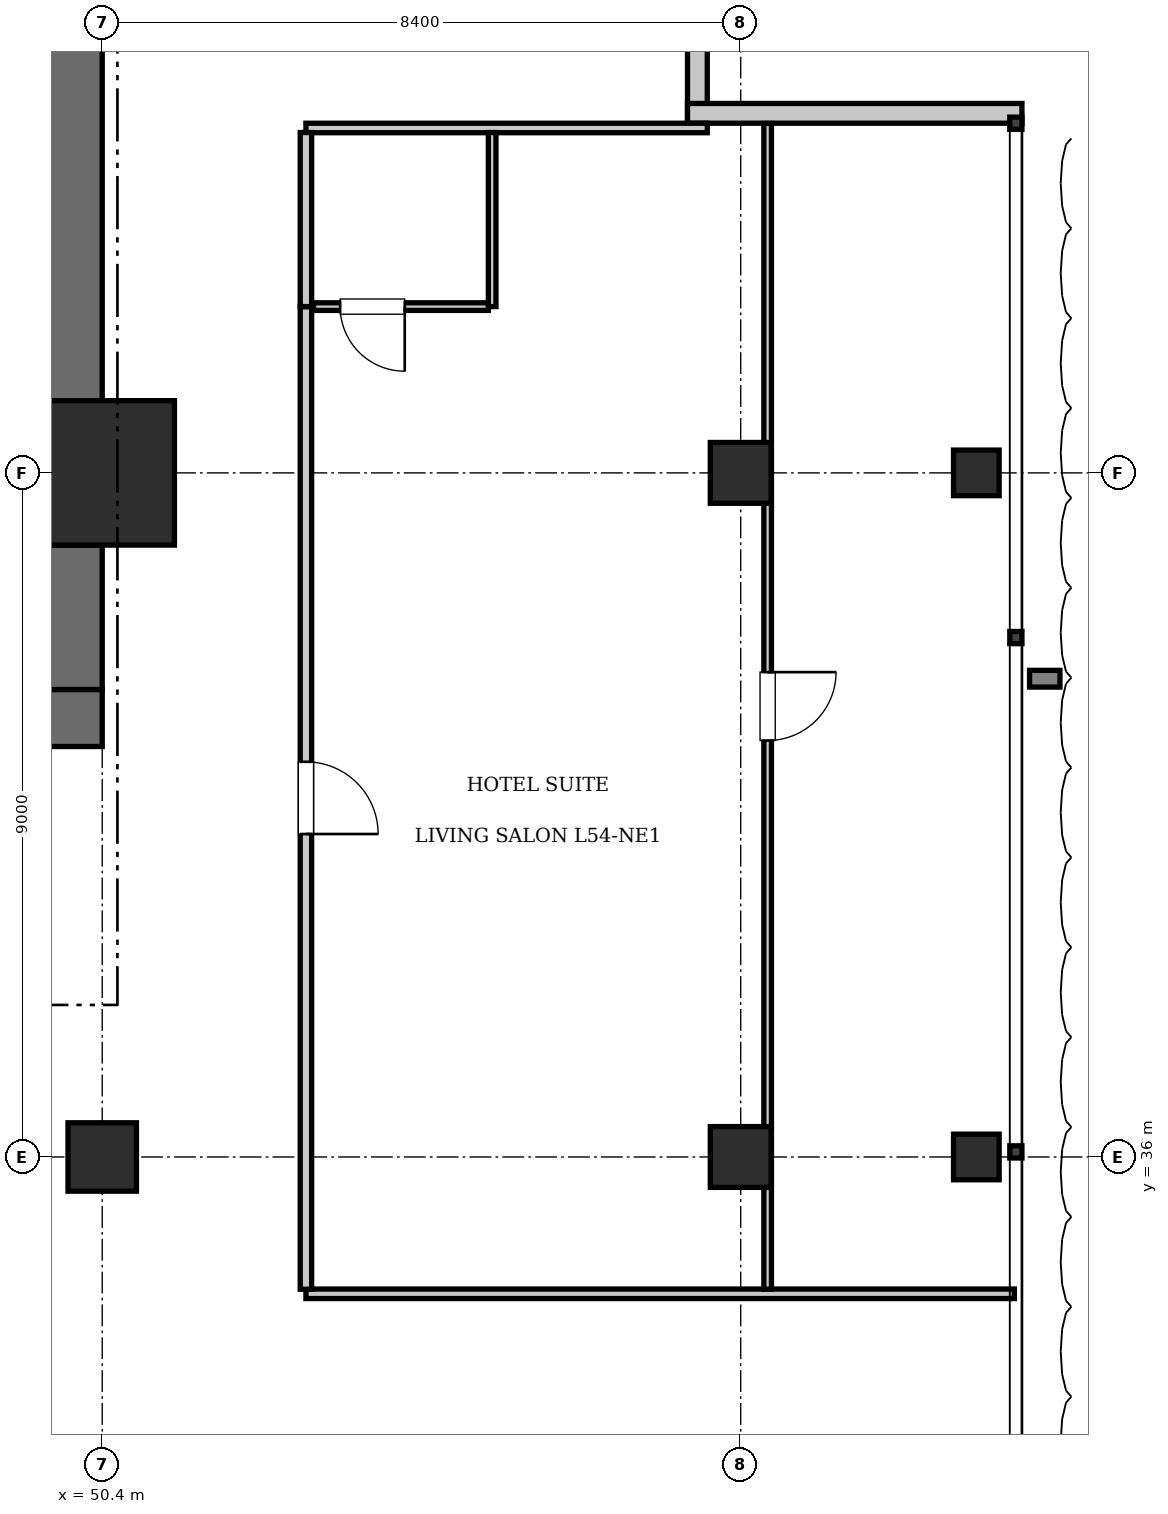
"""IFC4 building model, lengths in metres.
Left out: names, types, materials, properties, quantities, classifications, styles, units other than length and angle.
Written with IfcOpenShell. Run it as: python <this file> out.ifc"""

import sys

from ifc_helpers import new_model, si_unit, direction, frame, frame_2d, origin, origin_2d, place, context, subcontext, project, spatial, rectangle, i_section, extrude, element, fill, save


model = new_model("IFC4")
c1 = context("Model", 3, precision=1e-05, world=origin(), true_north=direction((0.0, 1.0)))
c2 = subcontext(c1, "Body", "Model", "MODEL_VIEW")
j1 = project(units=[si_unit("LENGTHUNIT", "METRE"), si_unit("PLANEANGLEUNIT", "RADIAN")], contexts=[c1])
p1 = place(None, origin())
s1 = spatial("IfcSite", under=j1, at=p1, CompositionType="ELEMENT")
p2 = place(p1, origin())
s2 = spatial("IfcBuilding", under=s1, at=p2, CompositionType="ELEMENT")
p3 = place(p2, frame((0.0, 0.0, 219.8)))
s3 = spatial("IfcBuildingStorey", under=s2, at=p3, CompositionType="ELEMENT", Elevation=219.8)
p4 = place(p3, frame((50.4, 45.0, 0.0), z_axis=(0.0, 0.0, 1.0), x_axis=(1.0, 0.0, 0.0)))
e1 = element("IfcColumn", 1, at=p4, inside=s3, PredefinedType="COLUMN", context=c2, shape_type="SweptSolid", body=[
    extrude(rectangle(XDim=1.9, YDim=1.9, at=origin_2d()), origin(), (0.0, 0.0, 1.0), 3.85),
])
p5 = place(p3, frame((43.6, 41.775, 0.0), z_axis=(0.0, 0.0, 1.0), x_axis=(1.0, 0.0, 0.0)))
e2 = element("IfcWall", 2, at=p5, inside=s3, PredefinedType="SHEAR", context=c2, shape_type="SweptSolid", body=[
    extrude(rectangle(XDim=6.8, YDim=0.75, at=frame_2d((3.4, 0.0))), origin(), (0.0, 0.0, 1.0), 3.85),
])
p6 = place(p5, frame((3.9, 0.0, 0.0)))
e3 = element("IfcOpeningElement", 3, at=p6, cuts=e2, PredefinedType="OPENING", context=c2, shape_type="SweptSolid", body=[
    extrude(rectangle(XDim=1.15, YDim=2.15, at=frame_2d((0.575, 1.075))), frame((0.0, 0.385, 0.0), z_axis=(0.0, -1.0, 0.0), x_axis=(1.0, 0.0, 0.0)), (0.0, 0.0, 1.0), 0.77),
])
p7 = place(p5, frame((0.55, 0.0, 0.0)))
e4 = element("IfcOpeningElement", 4, at=p7, cuts=e2, PredefinedType="OPENING", context=c2, shape_type="SweptSolid", body=[
    extrude(rectangle(XDim=1.1, YDim=2.2, at=frame_2d((0.55, 1.1))), frame((0.0, 0.385, 0.0), z_axis=(0.0, -1.0, 0.0), x_axis=(1.0, 0.0, 0.0)), (0.0, 0.0, 1.0), 0.77),
])
p8 = place(p3, frame((50.025, 42.15, 0.0), z_axis=(0.0, 0.0, 1.0), x_axis=(0.0, 1.0, 0.0)))
e5 = element("IfcWall", 5, at=p8, inside=s3, PredefinedType="SHEAR", context=c2, shape_type="SweptSolid", body=[
    extrude(rectangle(XDim=1.9, YDim=0.75, at=frame_2d((0.95, 0.0))), origin(), (0.0, 0.0, 1.0), 3.85),
])
p9 = place(p3, frame((50.025, 45.95, 0.0), z_axis=(0.0, 0.0, 1.0), x_axis=(0.0, 1.0, 0.0)))
e6 = element("IfcWall", 6, at=p9, inside=s3, PredefinedType="SHEAR", context=c2, shape_type="SweptSolid", body=[
    extrude(rectangle(XDim=7.3, YDim=0.75, at=frame_2d((3.65, 0.0))), origin(), (0.0, 0.0, 1.0), 3.85),
])
p10 = place(p3, frame((50.4, 36.0, 0.0), z_axis=(0.0, 0.0, 1.0), x_axis=(1.0, 0.0, 0.0)))
e7 = element("IfcColumn", 7, at=p10, inside=s3, PredefinedType="COLUMN", context=c2, shape_type="SweptSolid", body=[
    extrude(rectangle(XDim=0.9, YDim=0.9, at=origin_2d()), origin(), (0.0, 0.0, 1.0), 3.85),
])
for number, where, z_axis, x_axis in (
    (8, (58.8, 36.0, 0.0), (0.0, 0.0, 1.0), (1.0, 0.0, 0.0)),
    (9, (58.8, 45.0, 0.0), (0.0, 0.0, 1.0), (1.0, 0.0, 0.0)),
):
    element("IfcColumn", number, at=place(p3, frame(where, z_axis=z_axis, x_axis=x_axis)), inside=s3, PredefinedType="COLUMN", context=c2, shape_type="SweptSolid", body=[
        extrude(rectangle(XDim=0.8, YDim=0.8, at=origin_2d()), origin(), (0.0, 0.0, 1.0), 3.85),
    ])
for number, where, z_axis, x_axis in (
    (10, (61.9, 36.0, 0.0), (0.0, 0.0, 1.0), (1.0, 0.0, 0.0)),
    (11, (61.9, 45.0, 0.0), (0.0, 0.0, 1.0), (1.0, 0.0, 0.0)),
):
    element("IfcColumn", number, at=place(p3, frame(where, z_axis=z_axis, x_axis=x_axis)), inside=s3, PredefinedType="COLUMN", context=c2, shape_type="SweptSolid", body=[
        extrude(i_section(OverallWidth=0.6, OverallDepth=0.6, WebThickness=0.025, FlangeThickness=0.038, at=origin_2d()), origin(), (0.0, 0.0, 1.0), 3.85),
    ])
for number, where, z_axis, x_axis in (
    (12, (58.23, 54.0, 0.0), (0.0, 0.0, 1.0), (0.0, -1.0, 0.0)),
    (13, (58.1, 49.73, 0.0), (0.0, 0.0, 1.0), (1.0, 0.0, 0.0)),
):
    element("IfcWall", number, at=place(p3, frame(where, z_axis=z_axis, x_axis=x_axis)), inside=s3, PredefinedType="SOLIDWALL", context=c2, shape_type="SweptSolid", body=[
        extrude(rectangle(XDim=4.4, YDim=0.26, at=frame_2d((2.2, 0.0))), origin(), (0.0, 0.0, 1.0), 3.61),
    ])
p11 = place(p3, frame((53.08, 34.2, 0.0), z_axis=(0.0, 0.0, 1.0), x_axis=(1.0, 0.0, 0.0)))
e14 = element("IfcWall", 14, at=p11, inside=s3, PredefinedType="PARTITIONING", context=c2, shape_type="SweptSolid", body=[
    extrude(rectangle(XDim=9.32, YDim=0.125, at=frame_2d((4.66, 0.0))), origin(), (0.0, 0.0, 1.0), 3.61),
])
p12 = place(p3, frame((53.08, 49.538, 0.0), z_axis=(0.0, 0.0, 1.0), x_axis=(1.0, 0.0, 0.0)))
e15 = element("IfcWall", 15, at=p12, inside=s3, PredefinedType="PARTITIONING", context=c2, shape_type="SweptSolid", body=[
    extrude(rectangle(XDim=5.28, YDim=0.125, at=frame_2d((2.64, 0.0))), origin(), (0.0, 0.0, 1.0), 3.61),
])
p13 = place(p3, frame((53.08, 34.26, 0.0), z_axis=(0.0, 0.0, 1.0), x_axis=(0.0, 1.0, 0.0)))
e16 = element("IfcWall", 16, at=p13, inside=s3, PredefinedType="PARTITIONING", context=c2, shape_type="SweptSolid", body=[
    extrude(rectangle(XDim=12.927, YDim=0.15, at=frame_2d((6.464, 0.0))), origin(), (0.0, 0.0, 1.0), 3.61),
])
p14 = place(p13, frame((5.989, 0.0, 0.0)))
e17 = element("IfcOpeningElement", 17, at=p14, cuts=e16, PredefinedType="OPENING", context=c2, shape_type="SweptSolid", body=[
    extrude(rectangle(XDim=0.95, YDim=2.15, at=frame_2d((0.475, 1.075))), frame((0.0, 0.085, 0.0), z_axis=(0.0, -1.0, 0.0), x_axis=(1.0, 0.0, 0.0)), (0.0, 0.0, 1.0), 0.17),
])
p15 = place(p3, frame((53.08, 47.188, 0.0), z_axis=(0.0, 0.0, 1.0), x_axis=(0.0, 1.0, 0.0)))
e18 = element("IfcWall", 18, at=p15, inside=s3, PredefinedType="PARTITIONING", context=c2, shape_type="SweptSolid", body=[
    extrude(rectangle(XDim=2.29, YDim=0.15, at=frame_2d((1.145, 0.0))), origin(), (0.0, 0.0, 1.0), 3.61),
])
p16 = place(p3, frame((55.53, 47.188, 0.0), z_axis=(0.0, 0.0, 1.0), x_axis=(0.0, 1.0, 0.0)))
e19 = element("IfcWall", 19, at=p16, inside=s3, PredefinedType="PARTITIONING", context=c2, shape_type="SweptSolid", body=[
    extrude(rectangle(XDim=2.29, YDim=0.1, at=frame_2d((1.145, 0.0))), origin(), (0.0, 0.0, 1.0), 3.61),
])
p17 = place(p3, frame((53.18, 47.188, 0.0), z_axis=(0.0, 0.0, 1.0), x_axis=(1.0, 0.0, 0.0)))
e20 = element("IfcWall", 20, at=p17, inside=s3, PredefinedType="PARTITIONING", context=c2, shape_type="SweptSolid", body=[
    extrude(rectangle(XDim=2.3, YDim=0.1, at=frame_2d((1.15, 0.0))), origin(), (0.0, 0.0, 1.0), 3.61),
])
p18 = place(p17, frame((0.35, 0.0, 0.0)))
e21 = element("IfcOpeningElement", 21, at=p18, cuts=e20, PredefinedType="OPENING", context=c2, shape_type="SweptSolid", body=[
    extrude(rectangle(XDim=0.85, YDim=2.1, at=frame_2d((0.425, 1.05))), frame((0.0, 0.06, 0.0), z_axis=(0.0, -1.0, 0.0), x_axis=(1.0, 0.0, 0.0)), (0.0, 0.0, 1.0), 0.12),
])
p19 = place(p3, frame((59.154, 34.26, 0.0), z_axis=(0.0, 0.0, 1.0), x_axis=(0.0, 1.0, 0.0)))
e22 = element("IfcWall", 22, at=p19, inside=s3, PredefinedType="PARTITIONING", context=c2, shape_type="SweptSolid", body=[
    extrude(rectangle(XDim=15.337, YDim=0.1, at=frame_2d((7.669, 0.0))), origin(), (0.0, 0.0, 1.0), 3.61),
])
p20 = place(p19, frame((7.219, 0.0, 0.0)))
e23 = element("IfcOpeningElement", 23, at=p20, cuts=e22, PredefinedType="OPENING", context=c2, shape_type="SweptSolid", body=[
    extrude(rectangle(XDim=0.9, YDim=2.1, at=frame_2d((0.45, 1.05))), frame((0.0, 0.06, 0.0), z_axis=(0.0, -1.0, 0.0), x_axis=(1.0, 0.0, 0.0)), (0.0, 0.0, 1.0), 0.12),
])
p21 = place(p18, frame((0.85, 0.0, 0.0), z_axis=(0.0, 0.0, 1.0), x_axis=(-1.0, 0.0, 0.0)))
e24 = element("IfcDoor", 24, at=p21, inside=s3, OperationType="SINGLE_SWING_LEFT", PredefinedType="DOOR", context=c2, shape_type="SweptSolid", body=[
    extrude(rectangle(XDim=0.85, YDim=2.1, at=frame_2d((0.425, 1.05))), frame((0.0, 0.025, 0.0), z_axis=(0.0, -1.0, 0.0), x_axis=(1.0, 0.0, 0.0)), (0.0, 0.0, 1.0), 0.05),
])
fill(e21, e24)
p22 = place(p14, frame((0.95, 0.0, 0.0), z_axis=(0.0, 0.0, 1.0), x_axis=(-1.0, 0.0, 0.0)))
e25 = element("IfcDoor", 25, at=p22, inside=s3, OperationType="SINGLE_SWING_RIGHT", PredefinedType="DOOR", context=c2, shape_type="SweptSolid", body=[
    extrude(rectangle(XDim=0.95, YDim=2.15, at=frame_2d((0.475, 1.075))), frame((0.0, 0.025, 0.0), z_axis=(0.0, -1.0, 0.0), x_axis=(1.0, 0.0, 0.0)), (0.0, 0.0, 1.0), 0.05),
])
fill(e17, e25)
p23 = place(p20, frame((0.9, 0.0, 0.0), z_axis=(0.0, 0.0, 1.0), x_axis=(-1.0, 0.0, 0.0)))
e26 = element("IfcDoor", 26, at=p23, inside=s3, OperationType="SINGLE_SWING_LEFT", PredefinedType="DOOR", context=c2, shape_type="SweptSolid", body=[
    extrude(rectangle(XDim=0.9, YDim=2.1, at=frame_2d((0.45, 1.05))), frame((0.0, 0.025, 0.0), z_axis=(0.0, -1.0, 0.0), x_axis=(1.0, 0.0, 0.0)), (0.0, 0.0, 1.0), 0.05),
])
fill(e23, e26)
save(model, sys.argv[1])
